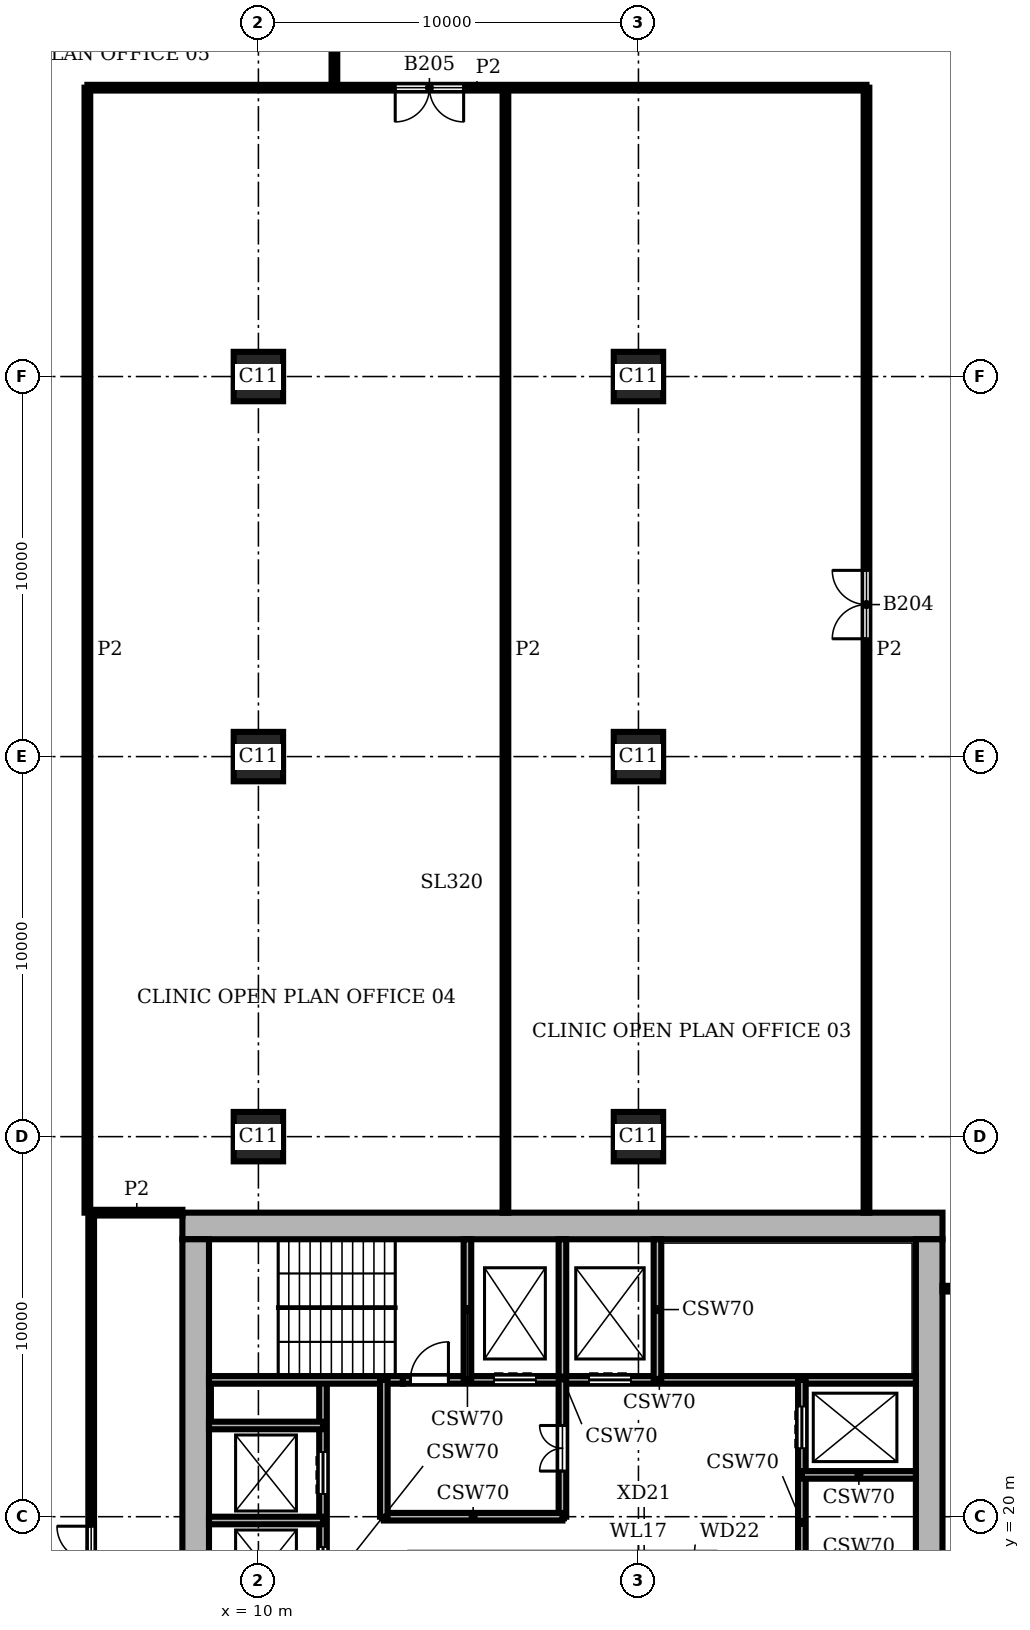
"""IFC4 building model, lengths in metres.
Left out: names, types, materials, properties, quantities, classifications, styles, units other than length and angle.
Written with IfcOpenShell. Run it as: python <this file> out.ifc"""

import sys

from ifc_helpers import new_model, si_unit, direction, frame, frame_2d, origin, origin_2d, place, context, subcontext, project, spatial, rectangle, extrude, element, fill, save


model = new_model("IFC4")
c1 = context("Model", 3, precision=1e-05, world=origin(), true_north=direction((0.0, 1.0)))
c2 = subcontext(c1, "Body", "Model", "MODEL_VIEW")
j1 = project(units=[si_unit("LENGTHUNIT", "METRE"), si_unit("PLANEANGLEUNIT", "RADIAN")], contexts=[c1])
p1 = place(None, origin())
s1 = spatial("IfcSite", under=j1, at=p1, CompositionType="ELEMENT")
p2 = place(p1, origin())
s2 = spatial("IfcBuilding", under=s1, at=p2, CompositionType="ELEMENT")
p3 = place(p2, frame((0.0, 0.0, 143.4)))
s3 = spatial("IfcBuildingStorey", under=s2, at=p3, CompositionType="ELEMENT", Elevation=143.4)
for number, where, z_axis, x_axis in (
    (1, (10.0, 30.0, 0.0), (0.0, 0.0, 1.0), (1.0, 0.0, 0.0)),
    (2, (10.0, 40.0, 0.0), (0.0, 0.0, 1.0), (1.0, 0.0, 0.0)),
    (3, (10.0, 50.0, 0.0), (0.0, 0.0, 1.0), (1.0, 0.0, 0.0)),
    (4, (20.0, 30.0, 0.0), (0.0, 0.0, 1.0), (1.0, 0.0, 0.0)),
    (5, (20.0, 40.0, 0.0), (0.0, 0.0, 1.0), (1.0, 0.0, 0.0)),
    (6, (20.0, 50.0, 0.0), (0.0, 0.0, 1.0), (1.0, 0.0, 0.0)),
):
    element("IfcColumn", number, at=place(p3, frame(where, z_axis=z_axis, x_axis=x_axis)), inside=s3, PredefinedType="COLUMN", context=c2, shape_type="SweptSolid", body=[
        extrude(rectangle(XDim=1.3, YDim=1.3, at=origin_2d()), origin(), (0.0, 0.0, 1.0), 3.9),
    ])
p4 = place(p3, frame((27.65, 8.7, 0.0), z_axis=(0.0, 0.0, 1.0), x_axis=(0.0, 1.0, 0.0)))
e7 = element("IfcWall", 7, at=p4, inside=s3, PredefinedType="SHEAR", context=c2, shape_type="SweptSolid", body=[
    extrude(rectangle(XDim=18.6, YDim=0.7, at=frame_2d((9.3, 0.0))), origin(), (0.0, 0.0, 1.0), 3.9),
])
p5 = place(p4, frame((4.75, 0.0, 0.0)))
e8 = element("IfcOpeningElement", 8, at=p5, cuts=e7, PredefinedType="OPENING", context=c2, shape_type="SweptSolid", body=[
    extrude(rectangle(XDim=1.6, YDim=2.1, at=frame_2d((0.8, 1.05))), frame((0.0, 0.36, 0.0), z_axis=(0.0, -1.0, 0.0), x_axis=(1.0, 0.0, 0.0)), (0.0, 0.0, 1.0), 0.72),
])
p6 = place(p3, frame((28.0, 27.65, 0.0), z_axis=(0.0, 0.0, 1.0), x_axis=(-1.0, 0.0, 0.0)))
e9 = element("IfcWall", 9, at=p6, inside=s3, PredefinedType="SHEAR", context=c2, shape_type="SweptSolid", body=[
    extrude(rectangle(XDim=20.0, YDim=0.7, at=frame_2d((10.0, 0.0))), origin(), (0.0, 0.0, 1.0), 3.9),
])
p7 = place(p3, frame((8.35, 27.3, 0.0), z_axis=(0.0, 0.0, 1.0), x_axis=(0.0, -1.0, 0.0)))
e10 = element("IfcWall", 10, at=p7, inside=s3, PredefinedType="SHEAR", context=c2, shape_type="SweptSolid", body=[
    extrude(rectangle(XDim=18.6, YDim=0.7, at=frame_2d((9.3, 0.0))), origin(), (0.0, 0.0, 1.0), 3.9),
])
p8 = place(p3, frame((8.7, 19.9, 0.0), z_axis=(0.0, 0.0, 1.0), x_axis=(1.0, 0.0, 0.0)))
e11 = element("IfcWall", 11, at=p8, inside=s3, PredefinedType="SHEAR", context=c2, shape_type="SweptSolid", body=[
    extrude(rectangle(XDim=3.0, YDim=0.2, at=frame_2d((1.5, 0.0))), origin(), (0.0, 0.0, 1.0), 3.58),
])
p9 = place(p3, frame((13.3, 20.0, 0.0), z_axis=(0.0, 0.0, 1.0), x_axis=(1.0, 0.0, 0.0)))
e12 = element("IfcWall", 12, at=p9, inside=s3, PredefinedType="SHEAR", context=c2, shape_type="SweptSolid", body=[
    extrude(rectangle(XDim=4.7, YDim=0.2, at=frame_2d((2.35, 0.0))), origin(), (0.0, 0.0, 1.0), 3.58),
])
for number, where, z_axis, x_axis in (
    (13, (24.3, 21.1, 0.0), (0.0, 0.0, 1.0), (1.0, 0.0, 0.0)),
    (14, (8.7, 22.4, 0.0), (0.0, 0.0, 1.0), (1.0, 0.0, 0.0)),
):
    element("IfcWall", number, at=place(p3, frame(where, z_axis=z_axis, x_axis=x_axis)), inside=s3, PredefinedType="SHEAR", context=c2, shape_type="SweptSolid", body=[
        extrude(rectangle(XDim=3.0, YDim=0.2, at=frame_2d((1.5, 0.0))), origin(), (0.0, 0.0, 1.0), 3.58),
    ])
p10 = place(p3, frame((8.7, 23.6, 0.0), z_axis=(0.0, 0.0, 1.0), x_axis=(1.0, 0.0, 0.0)))
e15 = element("IfcWall", 15, at=p10, inside=s3, PredefinedType="SHEAR", context=c2, shape_type="SweptSolid", body=[
    extrude(rectangle(XDim=5.1, YDim=0.2, at=frame_2d((2.55, 0.0))), origin(), (0.0, 0.0, 1.0), 3.58),
])
p11 = place(p3, frame((13.8, 23.6, 0.0), z_axis=(0.0, 0.0, 1.0), x_axis=(1.0, 0.0, 0.0)))
e16 = element("IfcWall", 16, at=p11, inside=s3, PredefinedType="SHEAR", context=c2, shape_type="SweptSolid", body=[
    extrude(rectangle(XDim=13.5, YDim=0.2, at=frame_2d((6.75, 0.0))), origin(), (0.0, 0.0, 1.0), 3.58),
])
p12 = place(p11, frame((2.4, 0.0, 0.0)))
e17 = element("IfcOpeningElement", 17, at=p12, cuts=e16, PredefinedType="OPENING", context=c2, shape_type="SweptSolid", body=[
    extrude(rectangle(XDim=1.1, YDim=2.1, at=frame_2d((0.55, 1.05))), frame((0.0, 0.11, 0.0), z_axis=(0.0, -1.0, 0.0), x_axis=(1.0, 0.0, 0.0)), (0.0, 0.0, 1.0), 0.22),
])
p13 = place(p11, frame((4.9, 0.0, 0.0)))
e18 = element("IfcOpeningElement", 18, at=p13, cuts=e16, PredefinedType="OPENING", context=c2, shape_type="SweptSolid", body=[
    extrude(rectangle(XDim=1.1, YDim=2.1, at=frame_2d((0.55, 1.05))), frame((0.0, 0.11, 0.0), z_axis=(0.0, -1.0, 0.0), x_axis=(1.0, 0.0, 0.0)), (0.0, 0.0, 1.0), 0.22),
])
p14 = place(p11, frame((0.2, 0.0, 0.0)))
e19 = element("IfcOpeningElement", 19, at=p14, cuts=e16, PredefinedType="OPENING", context=c2, shape_type="SweptSolid", body=[
    extrude(rectangle(XDim=1.0, YDim=2.1, at=frame_2d((0.5, 1.05))), frame((0.0, 0.11, 0.0), z_axis=(0.0, -1.0, 0.0), x_axis=(1.0, 0.0, 0.0)), (0.0, 0.0, 1.0), 0.22),
])
p15 = place(p3, frame((11.7, 12.4, 0.0), z_axis=(0.0, 0.0, 1.0), x_axis=(0.0, 1.0, 0.0)))
e20 = element("IfcWall", 20, at=p15, inside=s3, PredefinedType="SHEAR", context=c2, shape_type="SweptSolid", body=[
    extrude(rectangle(XDim=11.2, YDim=0.2, at=frame_2d((5.6, 0.0))), origin(), (0.0, 0.0, 1.0), 3.58),
])
p16 = place(p15, frame((0.7, 0.0, 0.0)))
e21 = element("IfcOpeningElement", 21, at=p16, cuts=e20, PredefinedType="OPENING", context=c2, shape_type="SweptSolid", body=[
    extrude(rectangle(XDim=1.1, YDim=2.1, at=frame_2d((0.55, 1.05))), frame((0.0, 0.11, 0.0), z_axis=(0.0, -1.0, 0.0), x_axis=(1.0, 0.0, 0.0)), (0.0, 0.0, 1.0), 0.22),
])
p17 = place(p15, frame((3.2, 0.0, 0.0)))
e22 = element("IfcOpeningElement", 22, at=p17, cuts=e20, PredefinedType="OPENING", context=c2, shape_type="SweptSolid", body=[
    extrude(rectangle(XDim=1.1, YDim=2.1, at=frame_2d((0.55, 1.05))), frame((0.0, 0.11, 0.0), z_axis=(0.0, -1.0, 0.0), x_axis=(1.0, 0.0, 0.0)), (0.0, 0.0, 1.0), 0.22),
])
p18 = place(p15, frame((5.7, 0.0, 0.0)))
e23 = element("IfcOpeningElement", 23, at=p18, cuts=e20, PredefinedType="OPENING", context=c2, shape_type="SweptSolid", body=[
    extrude(rectangle(XDim=1.1, YDim=2.1, at=frame_2d((0.55, 1.05))), frame((0.0, 0.11, 0.0), z_axis=(0.0, -1.0, 0.0), x_axis=(1.0, 0.0, 0.0)), (0.0, 0.0, 1.0), 0.22),
])
p19 = place(p15, frame((8.2, 0.0, 0.0)))
e24 = element("IfcOpeningElement", 24, at=p19, cuts=e20, PredefinedType="OPENING", context=c2, shape_type="SweptSolid", body=[
    extrude(rectangle(XDim=1.1, YDim=2.1, at=frame_2d((0.55, 1.05))), frame((0.0, 0.11, 0.0), z_axis=(0.0, -1.0, 0.0), x_axis=(1.0, 0.0, 0.0)), (0.0, 0.0, 1.0), 0.22),
])
p20 = place(p3, frame((13.3, 20.0, 0.0), z_axis=(0.0, 0.0, 1.0), x_axis=(0.0, 1.0, 0.0)))
e25 = element("IfcWall", 25, at=p20, inside=s3, PredefinedType="SHEAR", context=c2, shape_type="SweptSolid", body=[
    extrude(rectangle(XDim=3.6, YDim=0.2, at=frame_2d((1.8, 0.0))), origin(), (0.0, 0.0, 1.0), 3.58),
])
p21 = place(p3, frame((15.5, 23.6, 0.0), z_axis=(0.0, 0.0, 1.0), x_axis=(0.0, 1.0, 0.0)))
e26 = element("IfcWall", 26, at=p21, inside=s3, PredefinedType="SHEAR", context=c2, shape_type="SweptSolid", body=[
    extrude(rectangle(XDim=3.7, YDim=0.2, at=frame_2d((1.85, 0.0))), origin(), (0.0, 0.0, 1.0), 3.58),
])
p22 = place(p3, frame((18.0, 20.0, 0.0), z_axis=(0.0, 0.0, 1.0), x_axis=(0.0, 1.0, 0.0)))
e27 = element("IfcWall", 27, at=p22, inside=s3, PredefinedType="SHEAR", context=c2, shape_type="SweptSolid", body=[
    extrude(rectangle(XDim=7.3, YDim=0.2, at=frame_2d((3.65, 0.0))), origin(), (0.0, 0.0, 1.0), 3.58),
])
p23 = place(p22, frame((1.2, 0.0, 0.0)))
e28 = element("IfcOpeningElement", 28, at=p23, cuts=e27, PredefinedType="OPENING", context=c2, shape_type="SweptSolid", body=[
    extrude(rectangle(XDim=1.2, YDim=2.1, at=frame_2d((0.6, 1.05))), frame((0.0, 0.11, 0.0), z_axis=(0.0, -1.0, 0.0), x_axis=(1.0, 0.0, 0.0)), (0.0, 0.0, 1.0), 0.22),
])
p24 = place(p3, frame((20.5, 23.6, 0.0), z_axis=(0.0, 0.0, 1.0), x_axis=(0.0, 1.0, 0.0)))
e29 = element("IfcWall", 29, at=p24, inside=s3, PredefinedType="SHEAR", context=c2, shape_type="SweptSolid", body=[
    extrude(rectangle(XDim=3.7, YDim=0.2, at=frame_2d((1.85, 0.0))), origin(), (0.0, 0.0, 1.0), 3.58),
])
p25 = place(p3, frame((24.3, 16.1, 0.0), z_axis=(0.0, 0.0, 1.0), x_axis=(0.0, 1.0, 0.0)))
e30 = element("IfcWall", 30, at=p25, inside=s3, PredefinedType="SHEAR", context=c2, shape_type="SweptSolid", body=[
    extrude(rectangle(XDim=7.5, YDim=0.2, at=frame_2d((3.75, 0.0))), origin(), (0.0, 0.0, 1.0), 3.58),
])
p26 = place(p25, frame((5.7, 0.0, 0.0)))
e31 = element("IfcOpeningElement", 31, at=p26, cuts=e30, PredefinedType="OPENING", context=c2, shape_type="SweptSolid", body=[
    extrude(rectangle(XDim=1.1, YDim=2.1, at=frame_2d((0.55, 1.05))), frame((0.0, 0.11, 0.0), z_axis=(0.0, -1.0, 0.0), x_axis=(1.0, 0.0, 0.0)), (0.0, 0.0, 1.0), 0.22),
])
p27 = place(p3, frame((5.5, 28.0, 0.0), z_axis=(0.0, 0.0, 1.0), x_axis=(0.0, 1.0, 0.0)))
e32 = element("IfcWall", 32, at=p27, inside=s3, PredefinedType="PARTITIONING", context=c2, shape_type="SweptSolid", body=[
    extrude(rectangle(XDim=29.6, YDim=0.15, at=frame_2d((14.8, 0.0))), origin(), (0.0, 0.0, 1.0), 3.58),
])
p28 = place(p3, frame((5.6, 5.6, 0.0), z_axis=(0.0, 0.0, 1.0), x_axis=(0.0, 1.0, 0.0)))
e33 = element("IfcWall", 33, at=p28, inside=s3, PredefinedType="PARTITIONING", context=c2, shape_type="SweptSolid", body=[
    extrude(rectangle(XDim=22.4, YDim=0.15, at=frame_2d((11.2, 0.0))), origin(), (0.0, 0.0, 1.0), 3.58),
])
p29 = place(p28, frame((12.35, 0.0, 0.0)))
e34 = element("IfcOpeningElement", 34, at=p29, cuts=e33, PredefinedType="OPENING", context=c2, shape_type="SweptSolid", body=[
    extrude(rectangle(XDim=1.8, YDim=2.1, at=frame_2d((0.9, 1.05))), frame((0.0, 0.085, 0.0), z_axis=(0.0, -1.0, 0.0), x_axis=(1.0, 0.0, 0.0)), (0.0, 0.0, 1.0), 0.17),
])
p30 = place(p3, frame((12.0, 57.6, 0.0), z_axis=(0.0, 0.0, 1.0), x_axis=(0.0, 1.0, 0.0)))
e35 = element("IfcWall", 35, at=p30, inside=s3, PredefinedType="PARTITIONING", context=c2, shape_type="SweptSolid", body=[
    extrude(rectangle(XDim=2.4, YDim=0.15, at=frame_2d((1.2, 0.0))), origin(), (0.0, 0.0, 1.0), 3.58),
])
p31 = place(p3, frame((16.5, 28.0, 0.0), z_axis=(0.0, 0.0, 1.0), x_axis=(0.0, 1.0, 0.0)))
e36 = element("IfcWall", 36, at=p31, inside=s3, PredefinedType="PARTITIONING", context=c2, shape_type="SweptSolid", body=[
    extrude(rectangle(XDim=29.6, YDim=0.15, at=frame_2d((14.8, 0.0))), origin(), (0.0, 0.0, 1.0), 3.58),
])
p32 = place(p3, frame((26.0, 28.0, 0.0), z_axis=(0.0, 0.0, 1.0), x_axis=(0.0, 1.0, 0.0)))
e37 = element("IfcWall", 37, at=p32, inside=s3, PredefinedType="PARTITIONING", context=c2, shape_type="SweptSolid", body=[
    extrude(rectangle(XDim=29.6, YDim=0.15, at=frame_2d((14.8, 0.0))), origin(), (0.0, 0.0, 1.0), 3.58),
])
p33 = place(p32, frame((15.1, 0.0, 0.0)))
e38 = element("IfcOpeningElement", 38, at=p33, cuts=e37, PredefinedType="OPENING", context=c2, shape_type="SweptSolid", body=[
    extrude(rectangle(XDim=1.8, YDim=2.1, at=frame_2d((0.9, 1.05))), frame((0.0, 0.085, 0.0), z_axis=(0.0, -1.0, 0.0), x_axis=(1.0, 0.0, 0.0)), (0.0, 0.0, 1.0), 0.17),
])
p34 = place(p3, frame((28.0, 26.0, 0.0), z_axis=(0.0, 0.0, 1.0), x_axis=(1.0, 0.0, 0.0)))
e39 = element("IfcWall", 39, at=p34, inside=s3, PredefinedType="PARTITIONING", context=c2, shape_type="SweptSolid", body=[
    extrude(rectangle(XDim=2.799, YDim=0.15, at=frame_2d((1.399, 0.0))), origin(), (0.0, 0.0, 1.0), 3.58),
])
p35 = place(p3, frame((5.6, 28.0, 0.0), z_axis=(0.0, 0.0, 1.0), x_axis=(1.0, 0.0, 0.0)))
e40 = element("IfcWall", 40, at=p35, inside=s3, PredefinedType="PARTITIONING", context=c2, shape_type="SweptSolid", body=[
    extrude(rectangle(XDim=2.4, YDim=0.15, at=frame_2d((1.2, 0.0))), origin(), (0.0, 0.0, 1.0), 3.58),
])
p36 = place(p3, frame((5.5, 57.6, 0.0), z_axis=(0.0, 0.0, 1.0), x_axis=(1.0, 0.0, 0.0)))
e41 = element("IfcWall", 41, at=p36, inside=s3, PredefinedType="PARTITIONING", context=c2, shape_type="SweptSolid", body=[
    extrude(rectangle(XDim=20.5, YDim=0.15, at=frame_2d((10.25, 0.0))), origin(), (0.0, 0.0, 1.0), 3.58),
])
p37 = place(p36, frame((8.1, 0.0, 0.0)))
e42 = element("IfcOpeningElement", 42, at=p37, cuts=e41, PredefinedType="OPENING", context=c2, shape_type="SweptSolid", body=[
    extrude(rectangle(XDim=1.8, YDim=2.1, at=frame_2d((0.9, 1.05))), frame((0.0, 0.085, 0.0), z_axis=(0.0, -1.0, 0.0), x_axis=(1.0, 0.0, 0.0)), (0.0, 0.0, 1.0), 0.17),
])
p38 = place(p18, origin())
e43 = element("IfcDoor", 43, at=p38, inside=s3, OperationType="DOUBLE_DOOR_SLIDING", PredefinedType="DOOR", context=c2, shape_type="SweptSolid", body=[
    extrude(rectangle(XDim=1.1, YDim=2.1, at=frame_2d((0.55, 1.05))), frame((0.0, 0.025, 0.0), z_axis=(0.0, -1.0, 0.0), x_axis=(1.0, 0.0, 0.0)), (0.0, 0.0, 1.0), 0.05),
])
fill(e23, e43)
p39 = place(p19, origin())
e44 = element("IfcDoor", 44, at=p39, inside=s3, OperationType="DOUBLE_DOOR_SLIDING", PredefinedType="DOOR", context=c2, shape_type="SweptSolid", body=[
    extrude(rectangle(XDim=1.1, YDim=2.1, at=frame_2d((0.55, 1.05))), frame((0.0, 0.025, 0.0), z_axis=(0.0, -1.0, 0.0), x_axis=(1.0, 0.0, 0.0)), (0.0, 0.0, 1.0), 0.05),
])
fill(e24, e44)
p40 = place(p26, origin())
e45 = element("IfcDoor", 45, at=p40, inside=s3, OperationType="DOUBLE_DOOR_SLIDING", PredefinedType="DOOR", context=c2, shape_type="SweptSolid", body=[
    extrude(rectangle(XDim=1.1, YDim=2.1, at=frame_2d((0.55, 1.05))), frame((0.0, 0.025, 0.0), z_axis=(0.0, -1.0, 0.0), x_axis=(1.0, 0.0, 0.0)), (0.0, 0.0, 1.0), 0.05),
])
fill(e31, e45)
p41 = place(p12, origin())
e46 = element("IfcDoor", 46, at=p41, inside=s3, OperationType="DOUBLE_DOOR_SLIDING", PredefinedType="DOOR", context=c2, shape_type="SweptSolid", body=[
    extrude(rectangle(XDim=1.1, YDim=2.1, at=frame_2d((0.55, 1.05))), frame((0.0, 0.025, 0.0), z_axis=(0.0, -1.0, 0.0), x_axis=(1.0, 0.0, 0.0)), (0.0, 0.0, 1.0), 0.05),
])
fill(e17, e46)
p42 = place(p13, origin())
e47 = element("IfcDoor", 47, at=p42, inside=s3, OperationType="DOUBLE_DOOR_SLIDING", PredefinedType="DOOR", context=c2, shape_type="SweptSolid", body=[
    extrude(rectangle(XDim=1.1, YDim=2.1, at=frame_2d((0.55, 1.05))), frame((0.0, 0.025, 0.0), z_axis=(0.0, -1.0, 0.0), x_axis=(1.0, 0.0, 0.0)), (0.0, 0.0, 1.0), 0.05),
])
fill(e18, e47)
p43 = place(p14, origin())
e48 = element("IfcDoor", 48, at=p43, inside=s3, OperationType="SINGLE_SWING_RIGHT", PredefinedType="DOOR", context=c2, shape_type="SweptSolid", body=[
    extrude(rectangle(XDim=1.0, YDim=2.1, at=frame_2d((0.5, 1.05))), frame((0.0, 0.025, 0.0), z_axis=(0.0, -1.0, 0.0), x_axis=(1.0, 0.0, 0.0)), (0.0, 0.0, 1.0), 0.05),
])
fill(e19, e48)
p44 = place(p23, origin())
e49 = element("IfcDoor", 49, at=p44, inside=s3, OperationType="DOUBLE_DOOR_SINGLE_SWING", PredefinedType="DOOR", context=c2, shape_type="SweptSolid", body=[
    extrude(rectangle(XDim=1.2, YDim=2.1, at=frame_2d((0.6, 1.05))), frame((0.0, 0.025, 0.0), z_axis=(0.0, -1.0, 0.0), x_axis=(1.0, 0.0, 0.0)), (0.0, 0.0, 1.0), 0.05),
])
fill(e28, e49)
p45 = place(p33, origin())
e50 = element("IfcDoor", 50, at=p45, inside=s3, OperationType="DOUBLE_DOOR_SINGLE_SWING", PredefinedType="DOOR", context=c2, shape_type="SweptSolid", body=[
    extrude(rectangle(XDim=1.8, YDim=2.1, at=frame_2d((0.9, 1.05))), frame((0.0, 0.025, 0.0), z_axis=(0.0, -1.0, 0.0), x_axis=(1.0, 0.0, 0.0)), (0.0, 0.0, 1.0), 0.05),
])
fill(e38, e50)
p46 = place(p37, frame((1.8, 0.0, 0.0), z_axis=(0.0, 0.0, 1.0), x_axis=(-1.0, 0.0, 0.0)))
e51 = element("IfcDoor", 51, at=p46, inside=s3, OperationType="DOUBLE_DOOR_SINGLE_SWING", PredefinedType="DOOR", context=c2, shape_type="SweptSolid", body=[
    extrude(rectangle(XDim=1.8, YDim=2.1, at=frame_2d((0.9, 1.05))), frame((0.0, 0.025, 0.0), z_axis=(0.0, -1.0, 0.0), x_axis=(1.0, 0.0, 0.0)), (0.0, 0.0, 1.0), 0.05),
])
fill(e42, e51)
p47 = place(p29, origin())
e52 = element("IfcDoor", 52, at=p47, inside=s3, OperationType="DOUBLE_DOOR_SINGLE_SWING", PredefinedType="DOOR", context=c2, shape_type="SweptSolid", body=[
    extrude(rectangle(XDim=1.8, YDim=2.1, at=frame_2d((0.9, 1.05))), frame((0.0, 0.025, 0.0), z_axis=(0.0, -1.0, 0.0), x_axis=(1.0, 0.0, 0.0)), (0.0, 0.0, 1.0), 0.05),
])
fill(e34, e52)
save(model, sys.argv[1])
